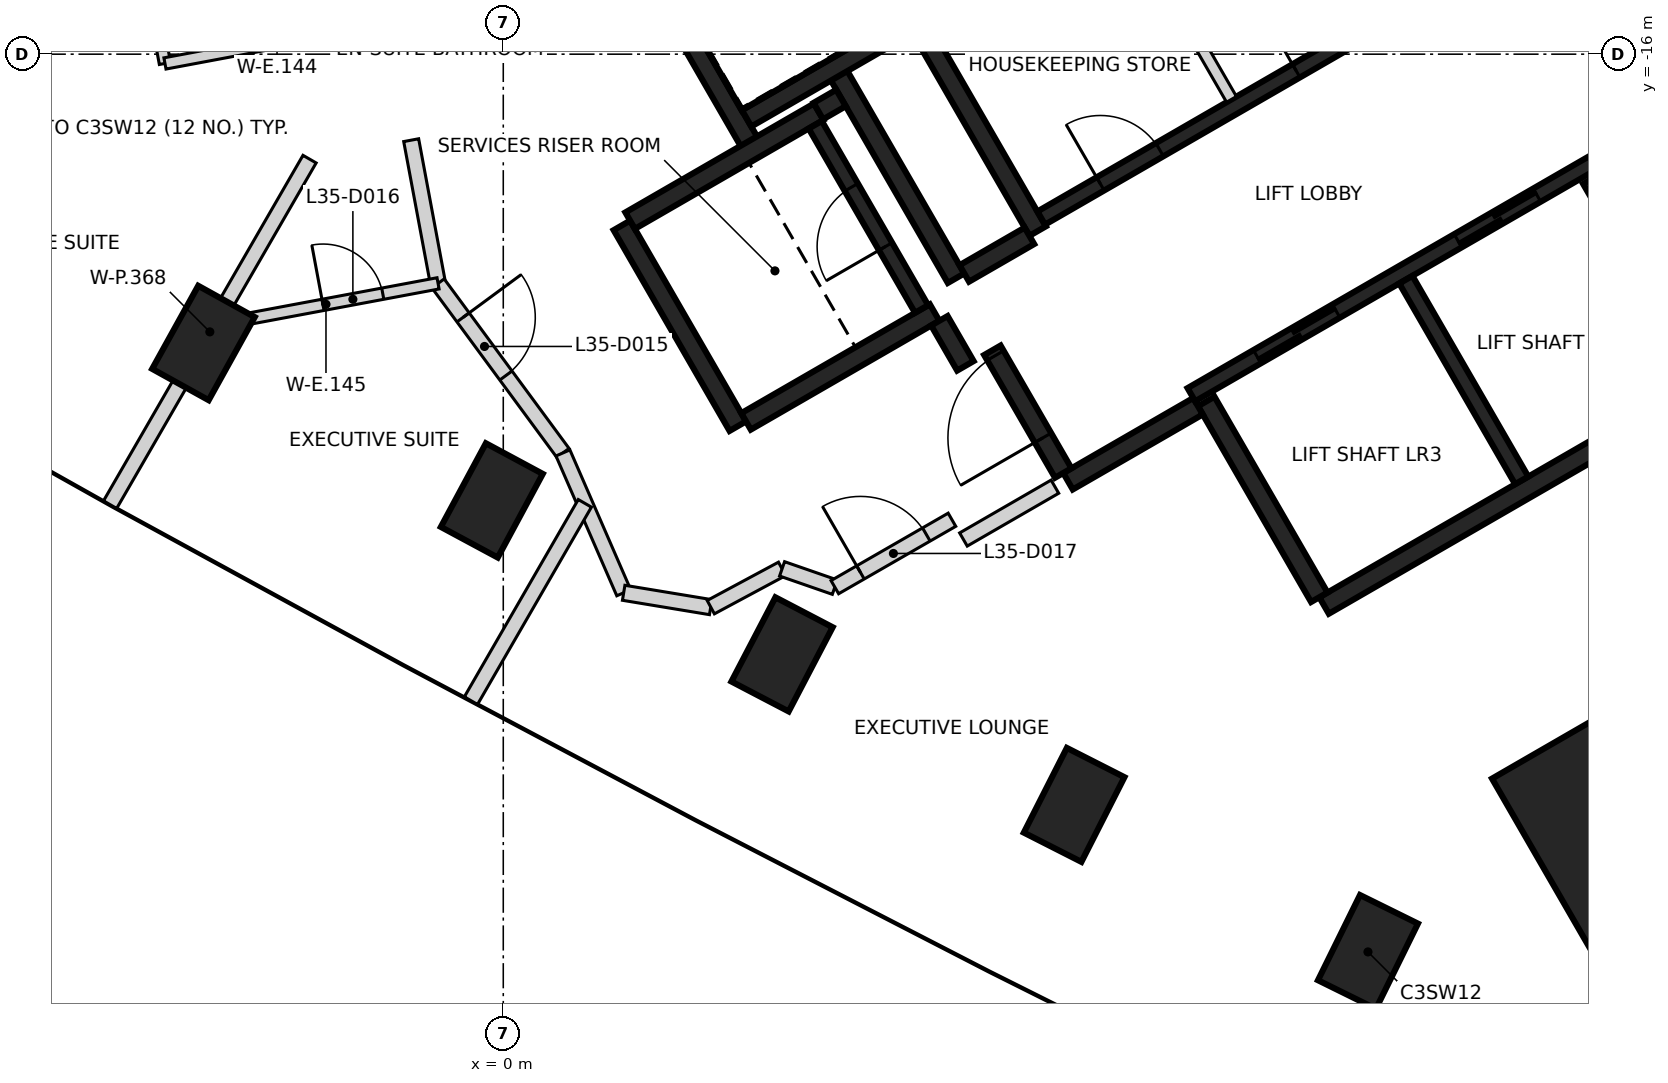
"""IFC4 building model, lengths in metres.
Left out: names, types, materials, properties, quantities, classifications, styles, units other than length and angle.
Written with IfcOpenShell. Run it as: python <this file> out.ifc"""

import sys

from ifc_helpers import new_model, si_unit, direction, frame, frame_2d, origin, origin_2d, place, context, subcontext, project, spatial, rectangle, extrude, element, fill, save


model = new_model("IFC4")
c1 = context("Model", 3, precision=1e-05, world=origin(), true_north=direction((0.0, 1.0)))
c2 = subcontext(c1, "Body", "Model", "MODEL_VIEW")
j1 = project(units=[si_unit("LENGTHUNIT", "METRE"), si_unit("PLANEANGLEUNIT", "RADIAN")], contexts=[c1])
p1 = place(None, origin())
s1 = spatial("IfcSite", under=j1, at=p1, CompositionType="ELEMENT")
p2 = place(p1, origin())
s2 = spatial("IfcBuilding", under=s1, at=p2, CompositionType="ELEMENT")
p3 = place(p2, frame((0.0, 0.0, 143.2)))
s3 = spatial("IfcBuildingStorey", under=s2, at=p3, CompositionType="ELEMENT", Elevation=143.2)
for number, where, z_axis, x_axis in (
    (1, (-3.945, -19.8, -0.4), (0.0, 0.0, 1.0), (0.485, 0.875, 0.0)),
    (2, (-0.151, -21.871, -0.4), (0.0, 0.0, 1.0), (0.474, 0.881, 0.0)),
    (3, (3.667, -23.896, -0.4), (0.0, 0.0, 1.0), (0.463, 0.886, 0.0)),
    (4, (7.51, -25.876, -0.4), (0.0, 0.0, 1.0), (0.453, 0.892, 0.0)),
    (5, (11.376, -27.811, -0.4), (0.0, 0.0, 1.0), (0.442, 0.897, 0.0)),
):
    element("IfcColumn", number, at=place(p3, frame(where, z_axis=z_axis, x_axis=x_axis)), inside=s3, PredefinedType="COLUMN", context=c2, shape_type="SweptSolid", body=[
        extrude(rectangle(XDim=1.25, YDim=0.85, at=origin_2d()), origin(), (0.0, 0.0, 1.0), 3.6),
    ])
p4 = place(p3, frame((15.207, -26.34, -0.4), z_axis=(0.0, 0.0, 1.0), x_axis=(-0.5, 0.866025403784, 0.0)))
e6 = element("IfcColumn", 6, at=p4, inside=s3, PredefinedType="COLUMN", context=c2, shape_type="SweptSolid", body=[
    extrude(rectangle(XDim=3.6, YDim=3.0, at=origin_2d()), origin(), (0.0, 0.0, 1.0), 3.6),
])
p5 = place(p3, frame((13.008, -11.181, 0.0), z_axis=(0.0, 0.0, 1.0), x_axis=(0.500004234368, -0.866022959057, 0.0)))
e7 = element("IfcWall", 7, at=p5, inside=s3, PredefinedType="SHEAR", context=c2, shape_type="SweptSolid", body=[
    extrude(rectangle(XDim=6.25, YDim=0.25, at=frame_2d((3.125, 0.0))), origin(), (0.0, 0.0, 1.0), 3.2),
])
p6 = place(p3, frame((15.865, -20.328, 0.0), z_axis=(0.0, 0.0, 1.0), x_axis=(-0.86602852612, -0.499994591916, 0.0)))
e8 = element("IfcWall", 8, at=p6, inside=s3, PredefinedType="SHEAR", context=c2, shape_type="SweptSolid", body=[
    extrude(rectangle(XDim=5.85, YDim=0.25, at=frame_2d((2.925, 0.0))), origin(), (0.0, 0.0, 1.0), 3.2),
])
p7 = place(p3, frame((3.235, -17.153, 0.0), z_axis=(0.0, 0.0, 1.0), x_axis=(-0.500008851346, 0.866020293397, 0.0)))
e9 = element("IfcWall", 9, at=p7, inside=s3, PredefinedType="SHEAR", context=c2, shape_type="SweptSolid", body=[
    extrude(rectangle(XDim=5.51, YDim=0.25, at=frame_2d((2.755, 0.0))), origin(), (0.0, 0.0, 1.0), 3.2),
])
p8 = place(p3, frame((7.031, -18.327, 0.0), z_axis=(0.0, 0.0, 1.0), x_axis=(-0.499971222258, 0.866042017984, 0.0)))
e10 = element("IfcWall", 10, at=p8, inside=s3, PredefinedType="SHEAR", context=c2, shape_type="SweptSolid", body=[
    extrude(rectangle(XDim=3.2, YDim=0.25, at=frame_2d((1.6, 0.0))), origin(), (0.0, 0.0, 1.0), 3.2),
])
for number, where, z_axis, x_axis in (
    (11, (14.315, -17.644, 0.0), (0.0, 0.0, 1.0), (0.5, -0.866, 0.0)),
    (12, (10.736, -23.145, 0.0), (0.0, 0.0, 1.0), (-0.5, 0.866, 0.0)),
):
    element("IfcWall", number, at=place(p3, frame(where, z_axis=z_axis, x_axis=x_axis)), inside=s3, PredefinedType="SHEAR", context=c2, shape_type="SweptSolid", body=[
        extrude(rectangle(XDim=2.974, YDim=0.25, at=frame_2d((1.487, 0.0))), origin(), (0.0, 0.0, 1.0), 3.2),
    ])
p9 = place(p3, frame((3.085, -20.894, 0.0), z_axis=(0.0, 0.0, 1.0), x_axis=(-0.499978833458, 0.866037623948, 0.0)))
e13 = element("IfcWall", 13, at=p9, inside=s3, PredefinedType="SHEAR", context=c2, shape_type="SweptSolid", body=[
    extrude(rectangle(XDim=3.05, YDim=0.25, at=frame_2d((1.525, 0.0))), origin(), (0.0, 0.0, 1.0), 3.2),
])
p10 = place(p3, frame((1.669, -18.19, 0.0), z_axis=(0.0, 0.0, 1.0), x_axis=(0.866042235819, 0.499970844928, 0.0)))
e14 = element("IfcWall", 14, at=p10, inside=s3, PredefinedType="SHEAR", context=c2, shape_type="SweptSolid", body=[
    extrude(rectangle(XDim=2.865, YDim=0.25, at=frame_2d((1.432, 0.0))), origin(), (0.0, 0.0, 1.0), 3.2),
])
p11 = place(p3, frame((5.675, -19.399, 0.0), z_axis=(0.0, 0.0, 1.0), x_axis=(-0.866026637627, -0.499997862916, 0.0)))
e15 = element("IfcWall", 15, at=p11, inside=s3, PredefinedType="SHEAR", context=c2, shape_type="SweptSolid", body=[
    extrude(rectangle(XDim=2.865, YDim=0.25, at=frame_2d((1.432, 0.0))), origin(), (0.0, 0.0, 1.0), 3.2),
])
p12 = place(p3, frame((4.414, -16.276, 0.0), z_axis=(0.0, 0.0, 1.0), x_axis=(0.500003324108, -0.866023484601, 0.0)))
e16 = element("IfcWall", 16, at=p12, inside=s3, PredefinedType="SHEAR", context=c2, shape_type="SweptSolid", body=[
    extrude(rectangle(XDim=3.085, YDim=0.25, at=frame_2d((1.542, 0.0))), origin(), (0.0, 0.0, 1.0), 3.2),
])
p13 = place(p3, frame((5.322, -15.619, 0.0), z_axis=(0.0, 0.0, 1.0), x_axis=(-0.866026229868, -0.499998569178, 0.0)))
e17 = element("IfcWall", 17, at=p13, inside=s3, PredefinedType="SHEAR", context=c2, shape_type="SweptSolid", body=[
    extrude(rectangle(XDim=2.449, YDim=0.25, at=frame_2d((1.225, 0.0))), origin(), (0.0, 0.0, 1.0), 3.2),
])
p14 = place(p3, frame((9.14, -20.631, 0.0), z_axis=(0.0, 0.0, 1.0), x_axis=(-0.866043531843, -0.499968599967, 0.0)))
e18 = element("IfcWall", 18, at=p14, inside=s3, PredefinedType="SHEAR", context=c2, shape_type="SweptSolid", body=[
    extrude(rectangle(XDim=1.975, YDim=0.25, at=frame_2d((0.987, 0.0))), origin(), (0.0, 0.0, 1.0), 3.2),
])
p15 = place(p3, frame((7.367, -21.51, 0.0), z_axis=(0.0, 0.0, 1.0), x_axis=(-0.499983108224, 0.866035156036, 0.0)))
e19 = element("IfcWall", 19, at=p15, inside=s3, PredefinedType="SHEAR", context=c2, shape_type="SweptSolid", body=[
    extrude(rectangle(XDim=1.865, YDim=0.25, at=frame_2d((0.932, 0.0))), origin(), (0.0, 0.0, 1.0), 3.2),
])
p16 = place(p15, frame((0.535, 0.0, 0.0)))
e20 = element("IfcOpeningElement", 20, at=p16, cuts=e19, PredefinedType="OPENING", context=c2, shape_type="SweptSolid", body=[
    extrude(rectangle(XDim=1.25, YDim=2.1, at=frame_2d((0.625, 1.05))), frame((0.0, 0.135, 0.0), z_axis=(0.0, -1.0, 0.0), x_axis=(1.0, 0.0, 0.0)), (0.0, 0.0, 1.0), 0.27),
])
p17 = place(p3, frame((6.065, -18.885, 0.0), z_axis=(0.0, 0.0, 1.0), x_axis=(0.866017078145, 0.500014420154, 0.0)))
e21 = element("IfcWall", 21, at=p17, inside=s3, PredefinedType="SHEAR", context=c2, shape_type="SweptSolid", body=[
    extrude(rectangle(XDim=0.989, YDim=0.25, at=frame_2d((0.495, 0.0))), origin(), (0.0, 0.0, 1.0), 3.2),
])
p18 = place(p3, frame((6.08, -20.1, 0.0), z_axis=(0.0, 0.0, 1.0), x_axis=(-0.500051773299, 0.865995510393, 0.0)))
e22 = element("IfcWall", 22, at=p18, inside=s3, PredefinedType="SHEAR", context=c2, shape_type="SweptSolid", body=[
    extrude(rectangle(XDim=0.685, YDim=0.25, at=frame_2d((0.342, 0.0))), origin(), (0.0, 0.0, 1.0), 3.2),
])
p19 = place(p3, frame((4.145, -16.749, 0.0), z_axis=(0.0, 0.0, 1.0), x_axis=(0.866185586049, 0.49972245349, 0.0)))
e23 = element("IfcWall", 23, at=p19, inside=s3, PredefinedType="SHEAR", context=c2, shape_type="SweptSolid", body=[
    extrude(rectangle(XDim=0.344, YDim=0.25, at=frame_2d((0.172, 0.0))), origin(), (0.0, 0.0, 1.0), 3.2),
])
p20 = place(p3, frame((9.052, -20.48, 0.0), z_axis=(0.0, 0.0, 1.0), x_axis=(0.866030299012, 0.499991521122, 0.0)))
e24 = element("IfcWall", 24, at=p20, inside=s3, PredefinedType="SHEAR", context=c2, shape_type="SweptSolid", body=[
    extrude(rectangle(XDim=6.1, YDim=0.2, at=frame_2d((3.05, 0.0))), origin(), (0.0, 0.0, 1.0), 3.2),
])
p21 = place(p20, frame((1.0, 0.0, 0.0)))
e25 = element("IfcOpeningElement", 25, at=p21, cuts=e24, PredefinedType="OPENING", context=c2, shape_type="SweptSolid", body=[
    extrude(rectangle(XDim=1.2, YDim=2.1, at=frame_2d((0.6, 1.05))), frame((0.0, 0.11, 0.0), z_axis=(0.0, -1.0, 0.0), x_axis=(1.0, 0.0, 0.0)), (0.0, 0.0, 1.0), 0.22),
])
p22 = place(p20, frame((4.05, 0.0, 0.0)))
e26 = element("IfcOpeningElement", 26, at=p22, cuts=e24, PredefinedType="OPENING", context=c2, shape_type="SweptSolid", body=[
    extrude(rectangle(XDim=1.2, YDim=2.1, at=frame_2d((0.6, 1.05))), frame((0.0, 0.11, 0.0), z_axis=(0.0, -1.0, 0.0), x_axis=(1.0, 0.0, 0.0)), (0.0, 0.0, 1.0), 0.22),
])
p23 = place(p3, frame((7.077, -18.156, 0.0), z_axis=(0.0, 0.0, 1.0), x_axis=(0.866038630372, 0.499977090179, 0.0)))
e27 = element("IfcWall", 27, at=p23, inside=s3, PredefinedType="SHEAR", context=c2, shape_type="SweptSolid", body=[
    extrude(rectangle(XDim=5.699, YDim=0.2, at=frame_2d((2.85, 0.0))), origin(), (0.0, 0.0, 1.0), 3.2),
])
p24 = place(p23, frame((0.899, 0.0, 0.0)))
e28 = element("IfcOpeningElement", 28, at=p24, cuts=e27, PredefinedType="OPENING", context=c2, shape_type="SweptSolid", body=[
    extrude(rectangle(XDim=0.9, YDim=2.1, at=frame_2d((0.45, 1.05))), frame((0.0, 0.11, 0.0), z_axis=(0.0, -1.0, 0.0), x_axis=(1.0, 0.0, 0.0)), (0.0, 0.0, 1.0), 0.22),
])
p25 = place(p23, frame((3.874, 0.0, 0.0)))
e29 = element("IfcOpeningElement", 29, at=p25, cuts=e27, PredefinedType="OPENING", context=c2, shape_type="SweptSolid", body=[
    extrude(rectangle(XDim=0.9, YDim=2.1, at=frame_2d((0.45, 1.05))), frame((0.0, 0.11, 0.0), z_axis=(0.0, -1.0, 0.0), x_axis=(1.0, 0.0, 0.0)), (0.0, 0.0, 1.0), 0.22),
])
p26 = place(p3, frame((11.875, -18.967, 0.0), z_axis=(0.0, 0.0, 1.0), x_axis=(0.49998131003, -0.866036194175, 0.0)))
e30 = element("IfcWall", 30, at=p26, inside=s3, PredefinedType="SHEAR", context=c2, shape_type="SweptSolid", body=[
    extrude(rectangle(XDim=3.048, YDim=0.2, at=frame_2d((1.524, 0.0))), origin(), (0.0, 0.0, 1.0), 3.2),
])
p27 = place(p3, frame((5.503, -19.352, 0.0), z_axis=(0.0, 0.0, 1.0), x_axis=(-0.499986818241, 0.866033014143, 0.0)))
e31 = element("IfcWall", 31, at=p27, inside=s3, PredefinedType="SHEAR", context=c2, shape_type="SweptSolid", body=[
    extrude(rectangle(XDim=2.798, YDim=0.2, at=frame_2d((1.399, 0.0))), origin(), (0.0, 0.0, 1.0), 3.2),
])
p28 = place(p27, frame((0.949, 0.0, 0.0)))
e32 = element("IfcOpeningElement", 32, at=p28, cuts=e31, PredefinedType="OPENING", context=c2, shape_type="SweptSolid", body=[
    extrude(rectangle(XDim=0.9, YDim=2.1, at=frame_2d((0.45, 1.05))), frame((0.0, 0.11, 0.0), z_axis=(0.0, -1.0, 0.0), x_axis=(1.0, 0.0, 0.0)), (0.0, 0.0, 1.0), 0.22),
])
p29 = place(p3, frame((8.207, -14.214, 0.0), z_axis=(0.0, 0.0, 1.0), x_axis=(0.50002746344, -0.86600954718, 0.0)))
e33 = element("IfcWall", 33, at=p29, inside=s3, PredefinedType="PARTITIONING", context=c2, shape_type="SweptSolid", body=[
    extrude(rectangle(XDim=2.748, YDim=0.15, at=frame_2d((1.374, 0.0))), origin(), (0.0, 0.0, 1.0), 3.2),
])
p30 = place(p3, frame((-1.212, -17.131, 0.0), z_axis=(0.0, 0.0, 1.0), x_axis=(0.183680924698, -0.982985919483, 0.0)))
e34 = element("IfcWall", 34, at=p30, inside=s3, PredefinedType="PARTITIONING", context=c2, shape_type="SweptSolid", body=[
    extrude(rectangle(XDim=1.917, YDim=0.2, at=frame_2d((0.958, 0.0))), origin(), (0.0, 0.0, 1.0), 3.2),
])
p31 = place(p3, frame((-0.858, -19.016, 0.0), z_axis=(0.0, 0.0, 1.0), x_axis=(0.593123867414, -0.805111220829, 0.0)))
e35 = element("IfcWall", 35, at=p31, inside=s3, PredefinedType="PARTITIONING", context=c2, shape_type="SweptSolid", body=[
    extrude(rectangle(XDim=2.77, YDim=0.2, at=frame_2d((1.385, 0.0))), origin(), (0.0, 0.0, 1.0), 3.2),
])
p32 = place(p31, frame((0.555, 0.0, 0.0)))
e36 = element("IfcOpeningElement", 36, at=p32, cuts=e35, PredefinedType="OPENING", context=c2, shape_type="SweptSolid", body=[
    extrude(rectangle(XDim=0.95, YDim=2.1, at=frame_2d((0.475, 1.05))), frame((0.0, 0.11, 0.0), z_axis=(0.0, -1.0, 0.0), x_axis=(1.0, 0.0, 0.0)), (0.0, 0.0, 1.0), 0.22),
])
p33 = place(p3, frame((0.785, -21.246, 0.0), z_axis=(0.0, 0.0, 1.0), x_axis=(0.398864077761, -0.917010058545, 0.0)))
e37 = element("IfcWall", 37, at=p33, inside=s3, PredefinedType="PARTITIONING", context=c2, shape_type="SweptSolid", body=[
    extrude(rectangle(XDim=2.006, YDim=0.2, at=frame_2d((1.003, 0.0))), origin(), (0.0, 0.0, 1.0), 2.3),
])
p34 = place(p3, frame((1.584, -23.086, 0.0), z_axis=(0.0, 0.0, 1.0), x_axis=(0.986654221629, -0.162829502674, 0.0)))
e38 = element("IfcWall", 38, at=p34, inside=s3, PredefinedType="PARTITIONING", context=c2, shape_type="SweptSolid", body=[
    extrude(rectangle(XDim=1.16, YDim=0.2, at=frame_2d((0.58, 0.0))), origin(), (0.0, 0.0, 1.0), 2.3),
])
p35 = place(p3, frame((2.73, -23.275, 0.0), z_axis=(0.0, 0.0, 1.0), x_axis=(0.880927165636, 0.473251866182, 0.0)))
e39 = element("IfcWall", 39, at=p35, inside=s3, PredefinedType="PARTITIONING", context=c2, shape_type="SweptSolid", body=[
    extrude(rectangle(XDim=1.065, YDim=0.2, at=frame_2d((0.532, 0.0))), origin(), (0.0, 0.0, 1.0), 3.2),
])
p36 = place(p3, frame((3.668, -22.771, 0.0), z_axis=(0.0, 0.0, 1.0), x_axis=(0.944689393684, -0.327966384652, 0.0)))
e40 = element("IfcWall", 40, at=p36, inside=s3, PredefinedType="PARTITIONING", context=c2, shape_type="SweptSolid", body=[
    extrude(rectangle(XDim=0.735, YDim=0.2, at=frame_2d((0.367, 0.0))), origin(), (0.0, 0.0, 1.0), 3.2),
])
p37 = place(p3, frame((4.362, -23.012, 0.0), z_axis=(0.0, 0.0, 1.0), x_axis=(0.866692617793, 0.49884256661, 0.0)))
e41 = element("IfcWall", 41, at=p37, inside=s3, PredefinedType="PARTITIONING", context=c2, shape_type="SweptSolid", body=[
    extrude(rectangle(XDim=1.778, YDim=0.2, at=frame_2d((0.889, 0.0))), origin(), (0.0, 0.0, 1.0), 3.2),
])
p38 = place(p37, frame((0.389, 0.0, 0.0)))
e42 = element("IfcOpeningElement", 42, at=p38, cuts=e41, PredefinedType="OPENING", context=c2, shape_type="SweptSolid", body=[
    extrude(rectangle(XDim=1.0, YDim=2.1, at=frame_2d((0.5, 1.05))), frame((0.0, 0.11, 0.0), z_axis=(0.0, -1.0, 0.0), x_axis=(1.0, 0.0, 0.0)), (0.0, 0.0, 1.0), 0.22),
])
p39 = place(p3, frame((6.054, -22.385, 0.0), z_axis=(0.0, 0.0, 1.0), x_axis=(0.86593101922, 0.500163443238, 0.0)))
e43 = element("IfcWall", 43, at=p39, inside=s3, PredefinedType="PARTITIONING", context=c2, shape_type="SweptSolid", body=[
    extrude(rectangle(XDim=1.39, YDim=0.2, at=frame_2d((0.695, 0.0))), origin(), (0.0, 0.0, 1.0), 3.2),
])
p40 = place(p3, frame((-9.882, -19.267, 0.0), z_axis=(0.0, 0.0, 1.0), x_axis=(0.499993811829, 0.866028976497, 0.0)))
e44 = element("IfcWall", 44, at=p40, inside=s3, PredefinedType="PARTITIONING", context=c2, shape_type="SweptSolid", body=[
    extrude(rectangle(XDim=12.227, YDim=0.2, at=frame_2d((6.114, 0.0))), origin(), (0.0, 0.0, 1.0), 2.3),
])
p41 = place(p3, frame((-5.173, -21.926, 0.0), z_axis=(0.0, 0.0, 1.0), x_axis=(0.499941227542, 0.86605933342, 0.0)))
e45 = element("IfcWall", 45, at=p41, inside=s3, PredefinedType="PARTITIONING", context=c2, shape_type="SweptSolid", body=[
    extrude(rectangle(XDim=5.249, YDim=0.2, at=frame_2d((2.625, 0.0))), origin(), (0.0, 0.0, 1.0), 3.2),
])
p42 = place(p3, frame((-0.425, -24.505, 0.0), z_axis=(0.0, 0.0, 1.0), x_axis=(0.499915194772, 0.86607436057, 0.0)))
e46 = element("IfcWall", 46, at=p42, inside=s3, PredefinedType="PARTITIONING", context=c2, shape_type="SweptSolid", body=[
    extrude(rectangle(XDim=2.997, YDim=0.2, at=frame_2d((1.499, 0.0))), origin(), (0.0, 0.0, 1.0), 2.3),
])
p43 = place(p3, frame((-4.817, -14.166, 0.0), z_axis=(0.0, 0.0, 1.0), x_axis=(0.183903339385, -0.982944332993, 0.0)))
e47 = element("IfcWall", 47, at=p43, inside=s3, PredefinedType="PARTITIONING", context=c2, shape_type="SweptSolid", body=[
    extrude(rectangle(XDim=1.99, YDim=0.15, at=frame_2d((0.995, 0.0))), origin(), (0.0, 0.0, 1.0), 3.2),
])
p44 = place(p3, frame((-4.451, -16.122, 0.0), z_axis=(0.0, 0.0, 1.0), x_axis=(0.982928336035, 0.18398882091, 0.0)))
e48 = element("IfcWall", 48, at=p44, inside=s3, PredefinedType="PARTITIONING", context=c2, shape_type="SweptSolid", body=[
    extrude(rectangle(XDim=3.0, YDim=0.15, at=frame_2d((1.5, 0.0))), origin(), (0.0, 0.0, 1.0), 3.2),
])
p45 = place(p3, frame((-3.807, -19.566, 0.0), z_axis=(0.0, 0.0, 1.0), x_axis=(0.982987155193, 0.183674311555, 0.0)))
e49 = element("IfcWall", 49, at=p45, inside=s3, PredefinedType="PARTITIONING", context=c2, shape_type="SweptSolid", body=[
    extrude(rectangle(XDim=3.0, YDim=0.15, at=frame_2d((1.5, 0.0))), origin(), (0.0, 0.0, 1.0), 3.2),
])
p46 = place(p45, frame((1.46, 0.0, 0.0)))
e50 = element("IfcOpeningElement", 50, at=p46, cuts=e49, PredefinedType="OPENING", context=c2, shape_type="SweptSolid", body=[
    extrude(rectangle(XDim=0.8, YDim=2.1, at=frame_2d((0.4, 1.05))), frame((0.0, 0.085, 0.0), z_axis=(0.0, -1.0, 0.0), x_axis=(1.0, 0.0, 0.0)), (0.0, 0.0, 1.0), 0.17),
])
p47 = place(p21, origin())
e51 = element("IfcDoor", 51, at=p47, inside=s3, OperationType="DOUBLE_DOOR_SLIDING", PredefinedType="DOOR", context=c2, shape_type="SweptSolid", body=[
    extrude(rectangle(XDim=1.2, YDim=2.1, at=frame_2d((0.6, 1.05))), frame((0.0, 0.025, 0.0), z_axis=(0.0, -1.0, 0.0), x_axis=(1.0, 0.0, 0.0)), (0.0, 0.0, 1.0), 0.05),
])
fill(e25, e51)
p48 = place(p22, origin())
e52 = element("IfcDoor", 52, at=p48, inside=s3, OperationType="DOUBLE_DOOR_SLIDING", PredefinedType="DOOR", context=c2, shape_type="SweptSolid", body=[
    extrude(rectangle(XDim=1.2, YDim=2.1, at=frame_2d((0.6, 1.05))), frame((0.0, 0.025, 0.0), z_axis=(0.0, -1.0, 0.0), x_axis=(1.0, 0.0, 0.0)), (0.0, 0.0, 1.0), 0.05),
])
fill(e26, e52)
p49 = place(p16, origin())
e53 = element("IfcDoor", 53, at=p49, inside=s3, OperationType="SINGLE_SWING_LEFT", PredefinedType="DOOR", context=c2, shape_type="SweptSolid", body=[
    extrude(rectangle(XDim=1.25, YDim=2.1, at=frame_2d((0.625, 1.05))), frame((0.0, 0.025, 0.0), z_axis=(0.0, -1.0, 0.0), x_axis=(1.0, 0.0, 0.0)), (0.0, 0.0, 1.0), 0.05),
])
fill(e20, e53)
p50 = place(p24, origin())
e54 = element("IfcDoor", 54, at=p50, inside=s3, OperationType="SINGLE_SWING_LEFT", PredefinedType="DOOR", context=c2, shape_type="SweptSolid", body=[
    extrude(rectangle(XDim=0.9, YDim=2.1, at=frame_2d((0.45, 1.05))), frame((0.0, 0.025, 0.0), z_axis=(0.0, -1.0, 0.0), x_axis=(1.0, 0.0, 0.0)), (0.0, 0.0, 1.0), 0.05),
])
fill(e28, e54)
p51 = place(p25, origin())
e55 = element("IfcDoor", 55, at=p51, inside=s3, OperationType="SINGLE_SWING_RIGHT", PredefinedType="DOOR", context=c2, shape_type="SweptSolid", body=[
    extrude(rectangle(XDim=0.9, YDim=2.1, at=frame_2d((0.45, 1.05))), frame((0.0, 0.025, 0.0), z_axis=(0.0, -1.0, 0.0), x_axis=(1.0, 0.0, 0.0)), (0.0, 0.0, 1.0), 0.05),
])
fill(e29, e55)
p52 = place(p28, origin())
e56 = element("IfcDoor", 56, at=p52, inside=s3, OperationType="SINGLE_SWING_LEFT", PredefinedType="DOOR", context=c2, shape_type="SweptSolid", body=[
    extrude(rectangle(XDim=0.9, YDim=2.1, at=frame_2d((0.45, 1.05))), frame((0.0, 0.025, 0.0), z_axis=(0.0, -1.0, 0.0), x_axis=(1.0, 0.0, 0.0)), (0.0, 0.0, 1.0), 0.05),
])
fill(e32, e56)
p53 = place(p32, frame((0.95, 0.0, 0.0), z_axis=(0.0, 0.0, 1.0), x_axis=(-1.0, 0.0, 0.0)))
e57 = element("IfcDoor", 57, at=p53, inside=s3, OperationType="SINGLE_SWING_LEFT", PredefinedType="DOOR", context=c2, shape_type="SweptSolid", body=[
    extrude(rectangle(XDim=0.95, YDim=2.1, at=frame_2d((0.475, 1.05))), frame((0.0, 0.025, 0.0), z_axis=(0.0, -1.0, 0.0), x_axis=(1.0, 0.0, 0.0)), (0.0, 0.0, 1.0), 0.05),
])
fill(e36, e57)
p54 = place(p46, frame((0.8, 0.0, 0.0), z_axis=(0.0, 0.0, 1.0), x_axis=(-1.0, 0.0, 0.0)))
e58 = element("IfcDoor", 58, at=p54, inside=s3, OperationType="SINGLE_SWING_LEFT", PredefinedType="DOOR", context=c2, shape_type="SweptSolid", body=[
    extrude(rectangle(XDim=0.8, YDim=2.1, at=frame_2d((0.4, 1.05))), frame((0.0, 0.025, 0.0), z_axis=(0.0, -1.0, 0.0), x_axis=(1.0, 0.0, 0.0)), (0.0, 0.0, 1.0), 0.05),
])
fill(e50, e58)
p55 = place(p38, frame((1.0, 0.0, 0.0), z_axis=(0.0, 0.0, 1.0), x_axis=(-1.0, 0.0, 0.0)))
e59 = element("IfcDoor", 59, at=p55, inside=s3, OperationType="SINGLE_SWING_LEFT", PredefinedType="DOOR", context=c2, shape_type="SweptSolid", body=[
    extrude(rectangle(XDim=1.0, YDim=2.1, at=frame_2d((0.5, 1.05))), frame((0.0, 0.025, 0.0), z_axis=(0.0, -1.0, 0.0), x_axis=(1.0, 0.0, 0.0)), (0.0, 0.0, 1.0), 0.05),
])
fill(e42, e59)
save(model, sys.argv[1])
